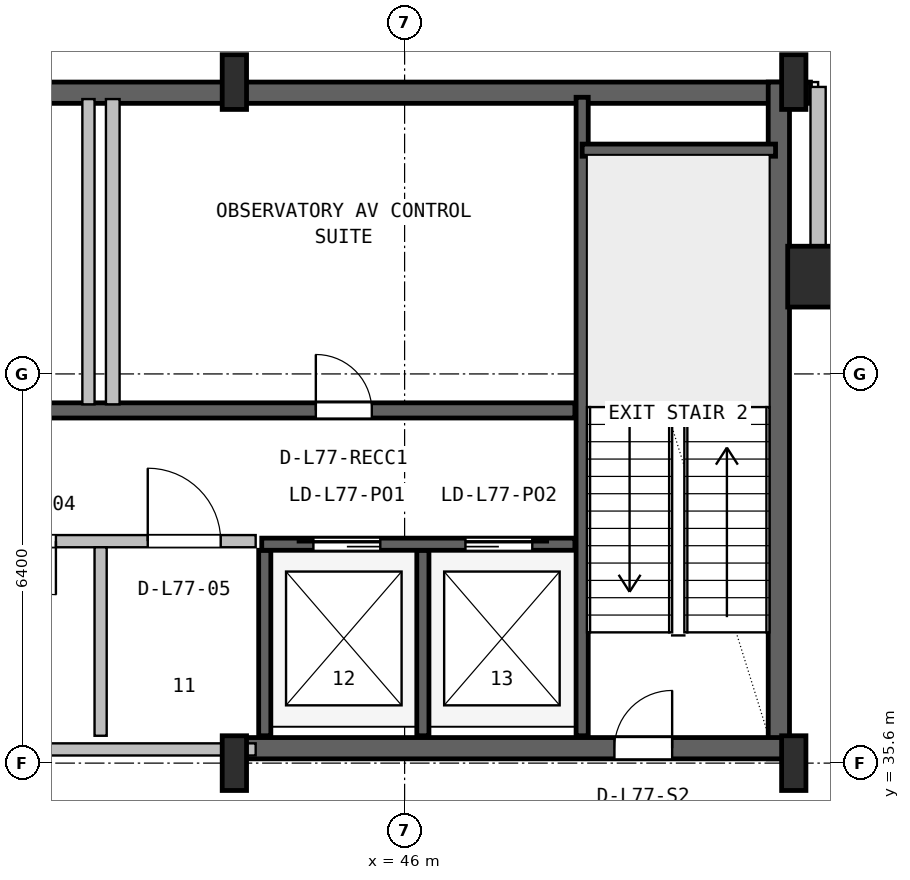
"""IFC4 building model, lengths in metres.
Left out: names, types, materials, properties, quantities, classifications, styles, units other than length and angle.
Written with IfcOpenShell. Run it as: python <this file> out.ifc"""

import sys

from ifc_helpers import new_model, si_unit, direction, frame, frame_2d, origin, origin_2d, place, context, subcontext, project, spatial, rectangle, hollow_rectangle, i_section, extrude, source, transform, mapped, element, fill, save


model = new_model("IFC4")
c1 = context("Model", 3, precision=1e-05, world=origin(), true_north=direction((0.0, 1.0)))
c2 = subcontext(c1, "Body", "Model", "MODEL_VIEW")
j1 = project(units=[si_unit("LENGTHUNIT", "METRE"), si_unit("PLANEANGLEUNIT", "RADIAN")], contexts=[c1])
p1 = place(None, origin())
s1 = spatial("IfcSite", under=j1, at=p1, CompositionType="ELEMENT")
p2 = place(p1, origin())
s2 = spatial("IfcBuilding", under=s1, at=p2, CompositionType="ELEMENT")
p3 = place(p2, frame((0.0, 0.0, 309.8)))
s3 = spatial("IfcBuildingStorey", under=s2, at=p3, CompositionType="ELEMENT", Elevation=309.8)
p4 = place(p3, frame((15.325, 46.625, 0.0), z_axis=(0.0, 0.0, 1.0), x_axis=(1.0, 0.0, 0.0)))
e1 = element("IfcWall", 1, at=p4, inside=s3, PredefinedType="SHEAR", context=c2, shape_type="SweptSolid", body=[
    extrude(rectangle(XDim=37.35, YDim=0.35, at=frame_2d((18.675, 0.0))), origin(), (0.0, 0.0, 1.0), 4.48),
])
p5 = place(p3, frame((52.155, 35.67, 0.0), z_axis=(0.0, 0.0, 1.0), x_axis=(0.0, 1.0, 0.0)))
e2 = element("IfcWall", 2, at=p5, inside=s3, PredefinedType="SHEAR", context=c2, shape_type="SweptSolid", body=[
    extrude(rectangle(XDim=11.13, YDim=0.35, at=frame_2d((5.565, 0.0))), origin(), (0.0, 0.0, 1.0), 4.48),
])
p6 = place(p3, frame((43.2, 35.845, 0.0), z_axis=(0.0, 0.0, 1.0), x_axis=(1.0, 0.0, 0.0)))
e3 = element("IfcWall", 3, at=p6, inside=s3, PredefinedType="SHEAR", context=c2, shape_type="SweptSolid", body=[
    extrude(rectangle(XDim=9.13, YDim=0.35, at=frame_2d((4.565, 0.0))), origin(), (0.0, 0.0, 1.0), 4.48),
])
p7 = place(p6, frame((6.25, 0.0, 0.0)))
e4 = element("IfcOpeningElement", 4, at=p7, cuts=e3, PredefinedType="OPENING", context=c2, shape_type="SweptSolid", body=[
    extrude(rectangle(XDim=0.95, YDim=2.1, at=frame_2d((0.475, 1.05))), frame((0.0, 0.185, 0.0), z_axis=(0.0, -1.0, 0.0), x_axis=(1.0, 0.0, 0.0)), (0.0, 0.0, 1.0), 0.37),
])
m1 = source(origin(), c2, "Body", "SweptSolid", [
    extrude(i_section(OverallWidth=0.4, OverallDepth=0.9, WebThickness=0.016, FlangeThickness=0.028, FilletRadius=0.016, at=origin_2d()), origin(), (0.0, 0.0, 1.0), 4.8),
])
for number, where, z_axis, x_axis in (
    (5, (43.2, 35.6, 0.0), (0.0, 0.0, 1.0), (1.0, 0.0, 0.0)),
    (6, (43.2, 46.8, 0.0), (0.0, 0.0, 1.0), (1.0, 0.0, 0.0)),
    (7, (52.4, 35.6, 0.0), (0.0, 0.0, 1.0), (1.0, 0.0, 0.0)),
    (8, (52.4, 46.8, 0.0), (0.0, 0.0, 1.0), (1.0, 0.0, 0.0)),
):
    element("IfcColumn", number, at=place(p3, frame(where, z_axis=z_axis, x_axis=x_axis)), inside=s3, PredefinedType="COLUMN", context=c2, shape_type="MappedRepresentation", body=[
        mapped(m1, transform((0.0, 0.0, 0.0), x_axis=(1.0, 0.0, 0.0), y_axis=(0.0, 1.0, 0.0), z_axis=(0.0, 0.0, 1.0), scale=1.0)),
    ])
m2 = source(origin(), c2, "Body", "SweptSolid", [
    extrude(hollow_rectangle(XDim=1.0, YDim=1.0, WallThickness=0.04, at=origin_2d()), origin(), (0.0, 0.0, 1.0), 4.8),
])
p8 = place(p3, frame((52.8, 43.6, 0.0), z_axis=(0.0, 0.0, 1.0), x_axis=(1.0, 0.0, 0.0)))
e9 = element("IfcColumn", 9, at=p8, inside=s3, PredefinedType="COLUMN", context=c2, shape_type="MappedRepresentation", body=[
    mapped(m2, transform((0.0, 0.0, 0.0), x_axis=(1.0, 0.0, 0.0), y_axis=(0.0, 1.0, 0.0), z_axis=(0.0, 0.0, 1.0), scale=1.0)),
])
p9 = place(p3, frame((52.93, 43.6, 0.0), z_axis=(0.0, 0.0, 1.0), x_axis=(1.0, 0.0, 0.0)))
e10 = element("IfcWall", 10, at=p9, inside=s3, PredefinedType="SOLIDWALL", context=c2, shape_type="SweptSolid", body=[
    extrude(rectangle(XDim=2.99, YDim=0.25, at=frame_2d((1.495, 0.0))), origin(), (0.0, 0.0, 1.0), 4.46),
])
p10 = place(p3, frame((52.8, 43.52, 0.0), z_axis=(0.0, 0.0, 1.0), x_axis=(0.0, 1.0, 0.0)))
e11 = element("IfcWall", 11, at=p10, inside=s3, PredefinedType="SOLIDWALL", context=c2, shape_type="SweptSolid", body=[
    extrude(rectangle(XDim=3.2, YDim=0.25, at=frame_2d((1.6, 0.0))), origin(), (0.0, 0.0, 1.0), 4.101),
])
p11 = place(p3, frame((48.92, 36.05, 0.0), z_axis=(0.0, 0.0, 1.0), x_axis=(0.0, 1.0, 0.0)))
e12 = element("IfcWall", 12, at=p11, inside=s3, PredefinedType="SHEAR", context=c2, shape_type="SweptSolid", body=[
    extrude(rectangle(XDim=10.5, YDim=0.2, at=frame_2d((5.25, 0.0))), origin(), (0.0, 0.0, 1.0), 4.48),
])
p12 = place(p3, frame((48.92, 45.68, 0.0), z_axis=(0.0, 0.0, 1.0), x_axis=(1.0, 0.0, 0.0)))
e13 = element("IfcWall", 13, at=p12, inside=s3, PredefinedType="SHEAR", context=c2, shape_type="SweptSolid", body=[
    extrude(rectangle(XDim=3.18, YDim=0.2, at=frame_2d((1.59, 0.0))), origin(), (0.0, 0.0, 1.0), 4.48),
])
p13 = place(p3, frame((24.98, 41.4, 0.0), z_axis=(0.0, 0.0, 1.0), x_axis=(1.0, 0.0, 0.0)))
e14 = element("IfcWall", 14, at=p13, inside=s3, PredefinedType="SHEAR", context=c2, shape_type="SweptSolid", body=[
    extrude(rectangle(XDim=23.82, YDim=0.25, at=frame_2d((11.91, 0.0))), origin(), (0.0, 0.0, 1.0), 4.48),
])
p14 = place(p13, frame((0.96, 0.0, 0.0)))
e15 = element("IfcOpeningElement", 15, at=p14, cuts=e14, PredefinedType="OPENING", context=c2, shape_type="SweptSolid", body=[
    extrude(rectangle(XDim=1.0, YDim=2.08, at=frame_2d((0.5, 1.04))), frame((0.0, 0.135, 0.0), z_axis=(0.0, -1.0, 0.0), x_axis=(1.0, 0.0, 0.0)), (0.0, 0.0, 1.0), 0.27),
])
p15 = place(p13, frame((3.56, 0.0, 0.0)))
e16 = element("IfcOpeningElement", 16, at=p15, cuts=e14, PredefinedType="OPENING", context=c2, shape_type="SweptSolid", body=[
    extrude(rectangle(XDim=1.0, YDim=2.08, at=frame_2d((0.5, 1.04))), frame((0.0, 0.135, 0.0), z_axis=(0.0, -1.0, 0.0), x_axis=(1.0, 0.0, 0.0)), (0.0, 0.0, 1.0), 0.27),
])
p16 = place(p13, frame((6.16, 0.0, 0.0)))
e17 = element("IfcOpeningElement", 17, at=p16, cuts=e14, PredefinedType="OPENING", context=c2, shape_type="SweptSolid", body=[
    extrude(rectangle(XDim=0.92, YDim=2.08, at=frame_2d((0.46, 1.04))), frame((0.0, 0.135, 0.0), z_axis=(0.0, -1.0, 0.0), x_axis=(1.0, 0.0, 0.0)), (0.0, 0.0, 1.0), 0.27),
])
p17 = place(p13, frame((11.56, 0.0, 0.0)))
e18 = element("IfcOpeningElement", 18, at=p17, cuts=e14, PredefinedType="OPENING", context=c2, shape_type="SweptSolid", body=[
    extrude(rectangle(XDim=1.0, YDim=2.08, at=frame_2d((0.5, 1.04))), frame((0.0, 0.135, 0.0), z_axis=(0.0, -1.0, 0.0), x_axis=(1.0, 0.0, 0.0)), (0.0, 0.0, 1.0), 0.27),
])
p18 = place(p13, frame((19.56, 0.0, 0.0)))
e19 = element("IfcOpeningElement", 19, at=p18, cuts=e14, PredefinedType="OPENING", context=c2, shape_type="SweptSolid", body=[
    extrude(rectangle(XDim=0.92, YDim=2.08, at=frame_2d((0.46, 1.04))), frame((0.0, 0.135, 0.0), z_axis=(0.0, -1.0, 0.0), x_axis=(1.0, 0.0, 0.0)), (0.0, 0.0, 1.0), 0.27),
])
for number, where, z_axis, x_axis in (
    (20, (43.7, 36.05, 0.0), (0.0, 0.0, 1.0), (0.0, 1.0, 0.0)),
    (21, (46.3, 36.05, 0.0), (0.0, 0.0, 1.0), (0.0, 1.0, 0.0)),
):
    element("IfcWall", number, at=place(p3, frame(where, z_axis=z_axis, x_axis=x_axis)), inside=s3, PredefinedType="SHEAR", context=c2, shape_type="SweptSolid", body=[
        extrude(rectangle(XDim=3.05, YDim=0.2, at=frame_2d((1.525, 0.0))), origin(), (0.0, 0.0, 1.0), 4.48),
    ])
p19 = place(p3, frame((43.65, 39.2, 0.0), z_axis=(0.0, 0.0, 1.0), x_axis=(1.0, 0.0, 0.0)))
e22 = element("IfcWall", 22, at=p19, inside=s3, PredefinedType="SHEAR", context=c2, shape_type="SweptSolid", body=[
    extrude(rectangle(XDim=5.15, YDim=0.2, at=frame_2d((2.575, 0.0))), origin(), (0.0, 0.0, 1.0), 4.48),
])
p20 = place(p19, frame((0.85, 0.0, 0.0)))
e23 = element("IfcOpeningElement", 23, at=p20, cuts=e22, PredefinedType="OPENING", context=c2, shape_type="SweptSolid", body=[
    extrude(rectangle(XDim=1.1, YDim=2.18, at=frame_2d((0.55, 1.09))), frame((0.0, 0.11, 0.0), z_axis=(0.0, -1.0, 0.0), x_axis=(1.0, 0.0, 0.0)), (0.0, 0.0, 1.0), 0.22),
])
p21 = place(p19, frame((3.35, 0.0, 0.0)))
e24 = element("IfcOpeningElement", 24, at=p21, cuts=e22, PredefinedType="OPENING", context=c2, shape_type="SweptSolid", body=[
    extrude(rectangle(XDim=1.1, YDim=2.18, at=frame_2d((0.55, 1.09))), frame((0.0, 0.11, 0.0), z_axis=(0.0, -1.0, 0.0), x_axis=(1.0, 0.0, 0.0)), (0.0, 0.0, 1.0), 0.22),
])
p22 = place(p3, frame((29.85, 35.825, 0.0), z_axis=(0.0, 0.0, 1.0), x_axis=(1.0, 0.0, 0.0)))
e25 = element("IfcWall", 25, at=p22, inside=s3, PredefinedType="SOLIDWALL", context=c2, shape_type="SweptSolid", body=[
    extrude(rectangle(XDim=13.7, YDim=0.2, at=frame_2d((6.85, 0.0))), origin(), (0.0, 0.0, 1.0), 3.505),
])
p23 = place(p3, frame((29.85, 39.25, 0.0), z_axis=(0.0, 0.0, 1.0), x_axis=(1.0, 0.0, 0.0)))
e26 = element("IfcWall", 26, at=p23, inside=s3, PredefinedType="SOLIDWALL", context=c2, shape_type="SweptSolid", body=[
    extrude(rectangle(XDim=13.7, YDim=0.2, at=frame_2d((6.85, 0.0))), origin(), (0.0, 0.0, 1.0), 4.46),
])
p24 = place(p23, frame((1.05, 0.0, 0.0)))
e27 = element("IfcOpeningElement", 27, at=p24, cuts=e26, PredefinedType="OPENING", context=c2, shape_type="SweptSolid", body=[
    extrude(rectangle(XDim=0.9, YDim=2.06, at=frame_2d((0.45, 1.03))), frame((0.0, 0.11, 0.0), z_axis=(0.0, -1.0, 0.0), x_axis=(1.0, 0.0, 0.0)), (0.0, 0.0, 1.0), 0.22),
])
p25 = place(p23, frame((4.05, 0.0, 0.0)))
e28 = element("IfcOpeningElement", 28, at=p25, cuts=e26, PredefinedType="OPENING", context=c2, shape_type="SweptSolid", body=[
    extrude(rectangle(XDim=0.9, YDim=2.06, at=frame_2d((0.45, 1.03))), frame((0.0, 0.11, 0.0), z_axis=(0.0, -1.0, 0.0), x_axis=(1.0, 0.0, 0.0)), (0.0, 0.0, 1.0), 0.22),
])
p26 = place(p23, frame((6.85, 0.0, 0.0)))
e29 = element("IfcOpeningElement", 29, at=p26, cuts=e26, PredefinedType="OPENING", context=c2, shape_type="SweptSolid", body=[
    extrude(rectangle(XDim=0.9, YDim=2.06, at=frame_2d((0.45, 1.03))), frame((0.0, 0.11, 0.0), z_axis=(0.0, -1.0, 0.0), x_axis=(1.0, 0.0, 0.0)), (0.0, 0.0, 1.0), 0.22),
])
p27 = place(p23, frame((9.535, 0.0, 0.0)))
e30 = element("IfcOpeningElement", 30, at=p27, cuts=e26, PredefinedType="OPENING", context=c2, shape_type="SweptSolid", body=[
    extrude(rectangle(XDim=0.88, YDim=2.06, at=frame_2d((0.44, 1.03))), frame((0.0, 0.11, 0.0), z_axis=(0.0, -1.0, 0.0), x_axis=(1.0, 0.0, 0.0)), (0.0, 0.0, 1.0), 0.22),
])
p28 = place(p23, frame((11.925, 0.0, 0.0)))
e31 = element("IfcOpeningElement", 31, at=p28, cuts=e26, PredefinedType="OPENING", context=c2, shape_type="SweptSolid", body=[
    extrude(rectangle(XDim=1.2, YDim=2.1, at=frame_2d((0.6, 1.05))), frame((0.0, 0.11, 0.0), z_axis=(0.0, -1.0, 0.0), x_axis=(1.0, 0.0, 0.0)), (0.0, 0.0, 1.0), 0.22),
])
p29 = place(p3, frame((41.0, 36.05, 0.0), z_axis=(0.0, 0.0, 1.0), x_axis=(0.0, 1.0, 0.0)))
e32 = element("IfcWall", 32, at=p29, inside=s3, PredefinedType="SOLIDWALL", context=c2, shape_type="SweptSolid", body=[
    extrude(rectangle(XDim=3.1, YDim=0.2, at=frame_2d((1.55, 0.0))), origin(), (0.0, 0.0, 1.0), 4.46),
])
p30 = place(p3, frame((40.8, 41.5, 0.0), z_axis=(0.0, 0.0, 1.0), x_axis=(0.0, 1.0, 0.0)))
e33 = element("IfcWall", 33, at=p30, inside=s3, PredefinedType="SOLIDWALL", context=c2, shape_type="SweptSolid", body=[
    extrude(rectangle(XDim=5.02, YDim=0.2, at=frame_2d((2.51, 0.0))), origin(), (0.0, 0.0, 1.0), 4.46),
])
p31 = place(p3, frame((41.2, 41.5, 0.0), z_axis=(0.0, 0.0, 1.0), x_axis=(0.0, 1.0, 0.0)))
e34 = element("IfcWall", 34, at=p31, inside=s3, PredefinedType="PARTITIONING", context=c2, shape_type="SweptSolid", body=[
    extrude(rectangle(XDim=5.02, YDim=0.225, at=frame_2d((2.51, 0.0))), origin(), (0.0, 0.0, 1.0), 4.46),
])
m3 = source(origin(), c2, "Body", "SweptSolid", [
    extrude(rectangle(XDim=0.95, YDim=2.1, at=frame_2d((0.475, 1.05))), frame((0.0, 0.025, 0.0), z_axis=(0.0, -1.0, 0.0), x_axis=(1.0, 0.0, 0.0)), (0.0, 0.0, 1.0), 0.05),
])
p32 = place(p7, origin())
e35 = element("IfcDoor", 35, at=p32, inside=s3, OperationType="SINGLE_SWING_RIGHT", PredefinedType="DOOR", context=c2, shape_type="MappedRepresentation", body=[
    mapped(m3, transform((0.0, 0.0, 0.0), x_axis=(1.0, 0.0, 0.0), y_axis=(0.0, 1.0, 0.0), z_axis=(0.0, 0.0, 1.0), scale=1.0)),
])
fill(e4, e35)
m4 = source(origin(), c2, "Body", "SweptSolid", [
    extrude(rectangle(XDim=0.92, YDim=2.08, at=frame_2d((0.46, 1.04))), frame((0.0, 0.025, 0.0), z_axis=(0.0, -1.0, 0.0), x_axis=(1.0, 0.0, 0.0)), (0.0, 0.0, 1.0), 0.05),
])
p33 = place(p18, origin())
e36 = element("IfcDoor", 36, at=p33, inside=s3, OperationType="SINGLE_SWING_LEFT", PredefinedType="DOOR", context=c2, shape_type="MappedRepresentation", body=[
    mapped(m4, transform((0.0, 0.0, 0.0), x_axis=(1.0, 0.0, 0.0), y_axis=(0.0, 1.0, 0.0), z_axis=(0.0, 0.0, 1.0), scale=1.0)),
])
fill(e19, e36)
m5 = source(origin(), c2, "Body", "SweptSolid", [
    extrude(rectangle(XDim=1.1, YDim=2.18, at=frame_2d((0.55, 1.09))), frame((0.0, 0.025, 0.0), z_axis=(0.0, -1.0, 0.0), x_axis=(1.0, 0.0, 0.0)), (0.0, 0.0, 1.0), 0.05),
])
p34 = place(p20, origin())
e37 = element("IfcDoor", 37, at=p34, inside=s3, OperationType="SLIDING_TO_LEFT", PredefinedType="DOOR", context=c2, shape_type="MappedRepresentation", body=[
    mapped(m5, transform((0.0, 0.0, 0.0), x_axis=(1.0, 0.0, 0.0), y_axis=(0.0, 1.0, 0.0), z_axis=(0.0, 0.0, 1.0), scale=1.0)),
])
fill(e23, e37)
p35 = place(p21, origin())
e38 = element("IfcDoor", 38, at=p35, inside=s3, OperationType="SLIDING_TO_RIGHT", PredefinedType="DOOR", context=c2, shape_type="MappedRepresentation", body=[
    mapped(m5, transform((0.0, 0.0, 0.0), x_axis=(1.0, 0.0, 0.0), y_axis=(0.0, 1.0, 0.0), z_axis=(0.0, 0.0, 1.0), scale=1.0)),
])
fill(e24, e38)
m6 = source(origin(), c2, "Body", "SweptSolid", [
    extrude(rectangle(XDim=0.88, YDim=2.06, at=frame_2d((0.44, 1.03))), frame((0.0, 0.025, 0.0), z_axis=(0.0, -1.0, 0.0), x_axis=(1.0, 0.0, 0.0)), (0.0, 0.0, 1.0), 0.05),
])
p36 = place(p27, frame((0.88, 0.0, 0.0), z_axis=(0.0, 0.0, 1.0), x_axis=(-1.0, 0.0, 0.0)))
e39 = element("IfcDoor", 39, at=p36, inside=s3, OperationType="SINGLE_SWING_RIGHT", PredefinedType="DOOR", context=c2, shape_type="MappedRepresentation", body=[
    mapped(m6, transform((0.0, 0.0, 0.0), x_axis=(1.0, 0.0, 0.0), y_axis=(0.0, 1.0, 0.0), z_axis=(0.0, 0.0, 1.0), scale=1.0)),
])
fill(e30, e39)
m7 = source(origin(), c2, "Body", "SweptSolid", [
    extrude(rectangle(XDim=1.2, YDim=2.1, at=frame_2d((0.6, 1.05))), frame((0.0, 0.025, 0.0), z_axis=(0.0, -1.0, 0.0), x_axis=(1.0, 0.0, 0.0)), (0.0, 0.0, 1.0), 0.05),
])
p37 = place(p28, origin())
e40 = element("IfcDoor", 40, at=p37, inside=s3, OperationType="SINGLE_SWING_LEFT", PredefinedType="DOOR", context=c2, shape_type="MappedRepresentation", body=[
    mapped(m7, transform((0.0, 0.0, 0.0), x_axis=(1.0, 0.0, 0.0), y_axis=(0.0, 1.0, 0.0), z_axis=(0.0, 0.0, 1.0), scale=1.0)),
])
fill(e31, e40)
save(model, sys.argv[1])
